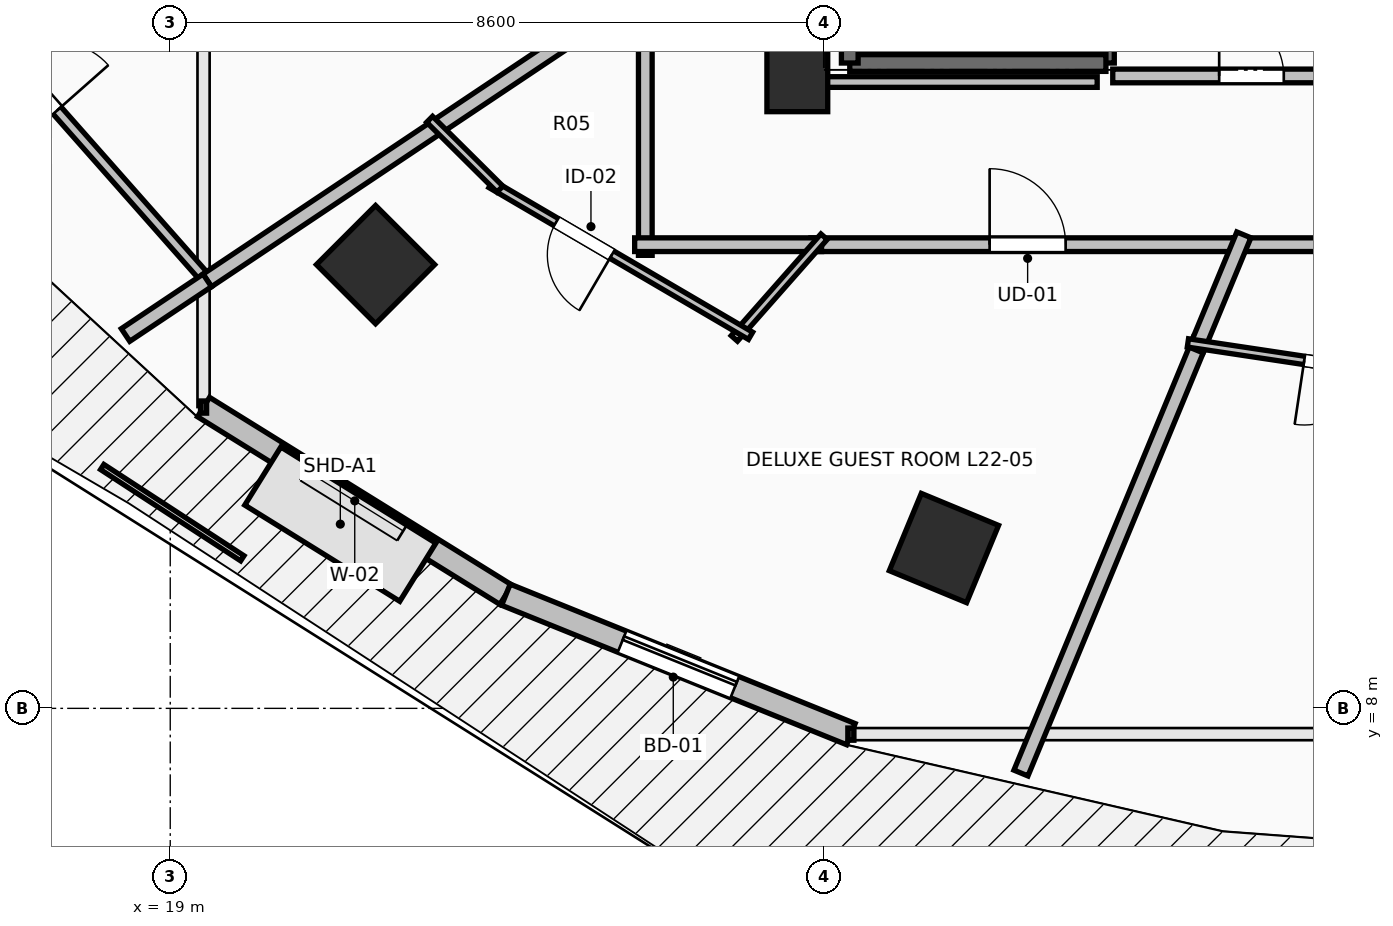
"""IFC4 building model, lengths in metres.
Left out: names, types, materials, properties, quantities, classifications, styles, units other than length and angle.
Written with IfcOpenShell. Run it as: python <this file> out.ifc"""

import sys

from ifc_helpers import new_model, si_unit, direction, frame, frame_2d, origin, origin_2d, place, context, subcontext, project, spatial, rectangle, extrude, element, fill, save


model = new_model("IFC4")
c1 = context("Model", 3, precision=1e-05, world=origin(), true_north=direction((0.0, 1.0)))
c2 = subcontext(c1, "Body", "Model", "MODEL_VIEW")
j1 = project(units=[si_unit("LENGTHUNIT", "METRE"), si_unit("PLANEANGLEUNIT", "RADIAN")], contexts=[c1])
p1 = place(None, origin())
s1 = spatial("IfcSite", under=j1, at=p1, CompositionType="ELEMENT")
p2 = place(p1, origin())
s2 = spatial("IfcBuilding", under=s1, at=p2, CompositionType="ELEMENT")
p3 = place(p2, frame((0.0, 0.0, 85.8)))
s3 = spatial("IfcBuildingStorey", under=s2, at=p3, CompositionType="ELEMENT", Elevation=85.8)
for number, where, z_axis, x_axis in (
    (1, (21.701, 13.838, 0.0), (0.0, 0.0, 1.0), (-0.707, -0.707, 0.0)),
    (2, (29.179, 10.109, 0.0), (0.0, 0.0, 1.0), (-0.383, -0.924, 0.0)),
):
    element("IfcColumn", number, at=place(p3, frame(where, z_axis=z_axis, x_axis=x_axis)), inside=s3, PredefinedType="COLUMN", context=c2, shape_type="SweptSolid", body=[
        extrude(rectangle(XDim=1.1, YDim=1.1, at=origin_2d()), origin(), (0.0, 0.0, 1.0), 3.5),
    ])
p4 = place(p3, frame((27.25, 16.45, 0.0), z_axis=(0.0, 0.0, 1.0), x_axis=(1.0, 0.0, 0.0)))
e3 = element("IfcColumn", 3, at=p4, inside=s3, PredefinedType="PILASTER", context=c2, shape_type="SweptSolid", body=[
    extrude(rectangle(XDim=0.8, YDim=1.2, at=origin_2d()), origin(), (0.0, 0.0, 1.0), 3.5),
])
p5 = place(p3, frame((19.438, 11.964, 0.0), z_axis=(0.0, 0.0, 1.0), x_axis=(0.849684479743, -0.527291461038, 0.0)))
e4 = element("IfcWall", 4, at=p5, inside=s3, PredefinedType="STANDARD", context=c2, shape_type="SweptSolid", body=[
    extrude(rectangle(XDim=4.681, YDim=0.3, at=frame_2d((2.341, 0.0))), origin(), (0.0, 0.0, 1.0), 3.24),
])
p6 = place(p5, frame((1.591, 0.0, 0.85)))
e5 = element("IfcOpeningElement", 5, at=p6, cuts=e4, PredefinedType="OPENING", context=c2, shape_type="SweptSolid", body=[
    extrude(rectangle(XDim=1.5, YDim=2.19, at=frame_2d((0.75, 1.095))), frame((0.0, 0.165, 0.0), z_axis=(0.0, -1.0, 0.0), x_axis=(1.0, 0.0, 0.0)), (0.0, 0.0, 1.0), 0.33),
])
p7 = place(p3, frame((23.416, 9.495, 0.0), z_axis=(0.0, 0.0, 1.0), x_axis=(0.927122233109, -0.374759075775, 0.0)))
e6 = element("IfcWall", 6, at=p7, inside=s3, PredefinedType="STANDARD", context=c2, shape_type="SweptSolid", body=[
    extrude(rectangle(XDim=4.895, YDim=0.3, at=frame_2d((2.448, 0.0))), origin(), (0.0, 0.0, 1.0), 3.24),
])
p8 = place(p7, frame((1.647, 0.0, 0.0)))
e7 = element("IfcOpeningElement", 7, at=p8, cuts=e6, PredefinedType="OPENING", context=c2, shape_type="SweptSolid", body=[
    extrude(rectangle(XDim=1.6, YDim=2.3, at=frame_2d((0.8, 1.15))), frame((0.0, 0.165, 0.0), z_axis=(0.0, -1.0, 0.0), x_axis=(1.0, 0.0, 0.0)), (0.0, 0.0, 1.0), 0.33),
])
p9 = place(p3, frame((31.31, 23.91, 0.0), z_axis=(0.0, 0.0, 1.0), x_axis=(0.0, -1.0, 0.0)))
e8 = element("IfcWall", 8, at=p9, inside=s3, PredefinedType="SOLIDWALL", context=c2, shape_type="SweptSolid", body=[
    extrude(rectangle(XDim=7.42, YDim=0.22, at=frame_2d((3.71, 0.0))), origin(), (0.0, 0.0, 1.0), 3.24),
])
p10 = place(p3, frame((31.31, 16.49, 0.0), z_axis=(0.0, 0.0, 1.0), x_axis=(-1.0, 0.0, 0.0)))
e9 = element("IfcWall", 9, at=p10, inside=s3, PredefinedType="SOLIDWALL", context=c2, shape_type="SweptSolid", body=[
    extrude(rectangle(XDim=3.37, YDim=0.22, at=frame_2d((1.685, 0.0))), origin(), (0.0, 0.0, 1.0), 3.24),
])
p11 = place(p3, frame((27.94, 16.49, 0.0), z_axis=(0.0, 0.0, 1.0), x_axis=(0.0, 1.0, 0.0)))
e10 = element("IfcWall", 10, at=p11, inside=s3, PredefinedType="SOLIDWALL", context=c2, shape_type="SweptSolid", body=[
    extrude(rectangle(XDim=7.42, YDim=0.22, at=frame_2d((3.71, 0.0))), origin(), (0.0, 0.0, 1.0), 3.24),
])
p12 = place(p3, frame((31.4, 16.32, 0.0), z_axis=(0.0, 0.0, 1.0), x_axis=(1.0, 0.0, 0.0)))
e11 = element("IfcWall", 11, at=p12, inside=s3, PredefinedType="PARTITIONING", context=c2, shape_type="SweptSolid", body=[
    extrude(rectangle(XDim=3.65, YDim=0.18, at=frame_2d((1.825, 0.0))), origin(), (0.0, 0.0, 1.0), 3.24),
])
p13 = place(p12, frame((1.4, 0.0, 0.0)))
e12 = element("IfcOpeningElement", 12, at=p13, cuts=e11, PredefinedType="OPENING", context=c2, shape_type="SweptSolid", body=[
    extrude(rectangle(XDim=0.85, YDim=2.1, at=frame_2d((0.425, 1.05))), frame((0.0, 0.105, 0.0), z_axis=(0.0, -1.0, 0.0), x_axis=(1.0, 0.0, 0.0)), (0.0, 0.0, 1.0), 0.21),
])
p14 = place(p3, frame((27.429, 14.1, 0.0), z_axis=(0.0, 0.0, 1.0), x_axis=(1.0, 0.0, 0.0)))
e13 = element("IfcWall", 13, at=p14, inside=s3, PredefinedType="PARTITIONING", context=c2, shape_type="SweptSolid", body=[
    extrude(rectangle(XDim=5.702, YDim=0.18, at=frame_2d((2.851, 0.0))), origin(), (0.0, 0.0, 1.0), 2.432),
])
p15 = place(p14, frame((2.351, 0.0, 0.0)))
e14 = element("IfcOpeningElement", 14, at=p15, cuts=e13, PredefinedType="OPENING", context=c2, shape_type="SweptSolid", body=[
    extrude(rectangle(XDim=1.0, YDim=2.15, at=frame_2d((0.5, 1.075))), frame((0.0, 0.105, 0.0), z_axis=(0.0, -1.0, 0.0), x_axis=(1.0, 0.0, 0.0)), (0.0, 0.0, 1.0), 0.21),
])
p16 = place(p3, frame((25.25, 17.549, 0.0), z_axis=(0.0, 0.0, 1.0), x_axis=(0.0, -1.0, 0.0)))
e15 = element("IfcWall", 15, at=p16, inside=s3, PredefinedType="PARTITIONING", context=c2, shape_type="SweptSolid", body=[
    extrude(rectangle(XDim=3.589, YDim=0.18, at=frame_2d((1.794, 0.0))), origin(), (0.0, 0.0, 1.0), 2.432),
])
p17 = place(p3, frame((25.11, 14.1, 0.0), z_axis=(0.0, 0.0, 1.0), x_axis=(1.0, 0.0, 0.0)))
e16 = element("IfcWall", 16, at=p17, inside=s3, PredefinedType="PARTITIONING", context=c2, shape_type="SweptSolid", body=[
    extrude(rectangle(XDim=2.459, YDim=0.18, at=frame_2d((1.229, 0.0))), origin(), (0.0, 0.0, 1.0), 2.874),
])
p18 = place(p3, frame((32.991, 14.1, 0.0), z_axis=(0.0, 0.0, 1.0), x_axis=(1.0, 0.0, 0.0)))
e17 = element("IfcWall", 17, at=p18, inside=s3, PredefinedType="PARTITIONING", context=c2, shape_type="SweptSolid", body=[
    extrude(rectangle(XDim=3.49, YDim=0.18, at=frame_2d((1.745, 0.0))), origin(), (0.0, 0.0, 1.0), 2.922),
])
p19 = place(p3, frame((14.94, 18.776, 0.0), z_axis=(0.0, 0.0, 1.0), x_axis=(0.662156478246, -0.749365597233, 0.0)))
e18 = element("IfcWall", 18, at=p19, inside=s3, PredefinedType="PARTITIONING", context=c2, shape_type="SweptSolid", body=[
    extrude(rectangle(XDim=6.867, YDim=0.14, at=frame_2d((3.434, 0.0))), origin(), (0.0, 0.0, 1.0), 3.24),
])
p20 = place(p19, frame((2.983, 0.0, 0.0)))
e19 = element("IfcOpeningElement", 19, at=p20, cuts=e18, PredefinedType="OPENING", context=c2, shape_type="SweptSolid", body=[
    extrude(rectangle(XDim=0.9, YDim=2.1, at=frame_2d((0.45, 1.05))), frame((0.0, 0.085, 0.0), z_axis=(0.0, -1.0, 0.0), x_axis=(1.0, 0.0, 0.0)), (0.0, 0.0, 1.0), 0.17),
])
p21 = place(p3, frame((19.487, 13.63, 0.0), z_axis=(0.0, 0.0, 1.0), x_axis=(0.831442874018, 0.555610247607, 0.0)))
e20 = element("IfcWall", 20, at=p21, inside=s3, PredefinedType="PARTITIONING", context=c2, shape_type="SweptSolid", body=[
    extrude(rectangle(XDim=6.931, YDim=0.2, at=frame_2d((3.466, 0.0))), origin(), (0.0, 0.0, 1.0), 2.432),
])
p22 = place(p3, frame((18.412, 12.912, 0.0), z_axis=(0.0, 0.0, 1.0), x_axis=(0.831643249848, 0.555310278118, 0.0)))
e21 = element("IfcWall", 21, at=p22, inside=s3, PredefinedType="PARTITIONING", context=c2, shape_type="SweptSolid", body=[
    extrude(rectangle(XDim=1.292, YDim=0.2, at=frame_2d((0.646, 0.0))), origin(), (0.0, 0.0, 1.0), 3.24),
])
p23 = place(p3, frame((27.602, 14.205, 0.0), z_axis=(0.0, 0.0, 1.0), x_axis=(-0.661454172329, -0.749985585134, 0.0)))
e22 = element("IfcWall", 22, at=p23, inside=s3, PredefinedType="PARTITIONING", context=c2, shape_type="SweptSolid", body=[
    extrude(rectangle(XDim=1.784, YDim=0.11, at=frame_2d((0.892, 0.0))), origin(), (0.0, 0.0, 1.0), 2.874),
])
p24 = place(p3, frame((26.635, 12.901, 0.0), z_axis=(0.0, 0.0, 1.0), x_axis=(-0.863173900656, 0.504906741117, 0.0)))
e23 = element("IfcWall", 23, at=p24, inside=s3, PredefinedType="PARTITIONING", context=c2, shape_type="SweptSolid", body=[
    extrude(rectangle(XDim=3.956, YDim=0.11, at=frame_2d((1.978, 0.0))), origin(), (0.0, 0.0, 1.0), 2.432),
])
p25 = place(p24, frame((2.113, 0.0, 0.0)))
e24 = element("IfcOpeningElement", 24, at=p25, cuts=e23, PredefinedType="OPENING", context=c2, shape_type="SweptSolid", body=[
    extrude(rectangle(XDim=0.85, YDim=2.1, at=frame_2d((0.425, 1.05))), frame((0.0, 0.07, 0.0), z_axis=(0.0, -1.0, 0.0), x_axis=(1.0, 0.0, 0.0)), (0.0, 0.0, 1.0), 0.14),
])
p26 = place(p3, frame((23.338, 14.831, 0.0), z_axis=(0.0, 0.0, 1.0), x_axis=(-0.709817225963, 0.70438590682, 0.0)))
e25 = element("IfcWall", 25, at=p26, inside=s3, PredefinedType="PARTITIONING", context=c2, shape_type="SweptSolid", body=[
    extrude(rectangle(XDim=1.303, YDim=0.11, at=frame_2d((0.652, 0.0))), origin(), (0.0, 0.0, 1.0), 2.432),
])
p27 = place(p3, frame((30.192, 7.149, 0.0), z_axis=(0.0, 0.0, 1.0), x_axis=(0.382705075352, 0.923870567395, 0.0)))
e26 = element("IfcWall", 26, at=p27, inside=s3, PredefinedType="PARTITIONING", context=c2, shape_type="SweptSolid", body=[
    extrude(rectangle(XDim=6.164, YDim=0.2, at=frame_2d((3.082, 0.0))), origin(), (0.0, 0.0, 1.0), 2.677),
])
p28 = place(p3, frame((32.497, 12.715, 0.0), z_axis=(0.0, 0.0, 1.0), x_axis=(0.382891039503, 0.923793511489, 0.0)))
e27 = element("IfcWall", 27, at=p28, inside=s3, PredefinedType="PARTITIONING", context=c2, shape_type="SweptSolid", body=[
    extrude(rectangle(XDim=1.639, YDim=0.2, at=frame_2d((0.82, 0.0))), origin(), (0.0, 0.0, 1.0), 2.922),
])
p29 = place(p3, frame((36.29, 12.221, 0.0), z_axis=(0.0, 0.0, 1.0), x_axis=(-0.988883185792, 0.148694468147, 0.0)))
e28 = element("IfcWall", 28, at=p29, inside=s3, PredefinedType="PARTITIONING", context=c2, shape_type="SweptSolid", body=[
    extrude(rectangle(XDim=3.946, YDim=0.11, at=frame_2d((1.973, 0.0))), origin(), (0.0, 0.0, 1.0), 3.24),
])
p30 = place(p29, frame((1.548, 0.0, 0.0)))
e29 = element("IfcOpeningElement", 29, at=p30, cuts=e28, PredefinedType="OPENING", context=c2, shape_type="SweptSolid", body=[
    extrude(rectangle(XDim=0.85, YDim=2.1, at=frame_2d((0.425, 1.05))), frame((0.0, 0.07, 0.0), z_axis=(0.0, -1.0, 0.0), x_axis=(1.0, 0.0, 0.0)), (0.0, 0.0, 1.0), 0.14),
])
p31 = place(p3, frame((31.195, 16.24, 0.0), z_axis=(0.0, 0.0, 1.0), x_axis=(-1.0, 0.0, 0.0)))
e30 = element("IfcWall", 30, at=p31, inside=s3, PredefinedType="PARTITIONING", context=c2, shape_type="SweptSolid", body=[
    extrude(rectangle(XDim=3.745, YDim=0.14, at=frame_2d((1.873, 0.0))), origin(), (0.0, 0.0, 1.0), 2.432),
])
p32 = place(p3, frame((27.45, 16.24, 0.0), z_axis=(0.0, 0.0, 1.0), x_axis=(0.0, 1.0, 0.0)))
e31 = element("IfcWall", 31, at=p32, inside=s3, PredefinedType="PARTITIONING", context=c2, shape_type="SweptSolid", body=[
    extrude(rectangle(XDim=7.514, YDim=0.14, at=frame_2d((3.757, 0.0))), origin(), (0.0, 0.0, 1.0), 2.432),
])
p33 = place(p8, origin())
e32 = element("IfcDoor", 32, at=p33, inside=s3, OperationType="SLIDING_TO_LEFT", PredefinedType="DOOR", context=c2, shape_type="SweptSolid", body=[
    extrude(rectangle(XDim=1.6, YDim=2.3, at=frame_2d((0.8, 1.15))), frame((0.0, 0.025, 0.0), z_axis=(0.0, -1.0, 0.0), x_axis=(1.0, 0.0, 0.0)), (0.0, 0.0, 1.0), 0.05),
])
fill(e7, e32)
p34 = place(p6, origin())
e33 = element("IfcWindow", 33, at=p34, inside=s3, PartitioningType="SINGLE_PANEL", PredefinedType="WINDOW", context=c2, shape_type="SweptSolid", body=[
    extrude(rectangle(XDim=1.5, YDim=2.19, at=frame_2d((0.75, 1.095))), frame((0.0, 0.03, 0.0), z_axis=(0.0, -1.0, 0.0), x_axis=(1.0, 0.0, 0.0)), (0.0, 0.0, 1.0), 0.06),
])
fill(e5, e33)
p35 = place(p13, origin())
e34 = element("IfcDoor", 34, at=p35, inside=s3, OperationType="SINGLE_SWING_LEFT", PredefinedType="DOOR", context=c2, shape_type="SweptSolid", body=[
    extrude(rectangle(XDim=0.85, YDim=2.1, at=frame_2d((0.425, 1.05))), frame((0.0, 0.025, 0.0), z_axis=(0.0, -1.0, 0.0), x_axis=(1.0, 0.0, 0.0)), (0.0, 0.0, 1.0), 0.05),
])
fill(e12, e34)
p36 = place(p15, origin())
e35 = element("IfcDoor", 35, at=p36, inside=s3, OperationType="SINGLE_SWING_LEFT", PredefinedType="DOOR", context=c2, shape_type="SweptSolid", body=[
    extrude(rectangle(XDim=1.0, YDim=2.15, at=frame_2d((0.5, 1.075))), frame((0.0, 0.025, 0.0), z_axis=(0.0, -1.0, 0.0), x_axis=(1.0, 0.0, 0.0)), (0.0, 0.0, 1.0), 0.05),
])
fill(e14, e35)
p37 = place(p20, origin())
e36 = element("IfcDoor", 36, at=p37, inside=s3, OperationType="SINGLE_SWING_RIGHT", PredefinedType="DOOR", context=c2, shape_type="SweptSolid", body=[
    extrude(rectangle(XDim=0.9, YDim=2.1, at=frame_2d((0.45, 1.05))), frame((0.0, 0.025, 0.0), z_axis=(0.0, -1.0, 0.0), x_axis=(1.0, 0.0, 0.0)), (0.0, 0.0, 1.0), 0.05),
])
fill(e19, e36)
p38 = place(p25, origin())
e37 = element("IfcDoor", 37, at=p38, inside=s3, OperationType="SINGLE_SWING_LEFT", PredefinedType="DOOR", context=c2, shape_type="SweptSolid", body=[
    extrude(rectangle(XDim=0.85, YDim=2.1, at=frame_2d((0.425, 1.05))), frame((0.0, 0.025, 0.0), z_axis=(0.0, -1.0, 0.0), x_axis=(1.0, 0.0, 0.0)), (0.0, 0.0, 1.0), 0.05),
])
fill(e24, e37)
p39 = place(p30, origin())
e38 = element("IfcDoor", 38, at=p39, inside=s3, OperationType="SINGLE_SWING_RIGHT", PredefinedType="DOOR", context=c2, shape_type="SweptSolid", body=[
    extrude(rectangle(XDim=0.85, YDim=2.1, at=frame_2d((0.425, 1.05))), frame((0.0, 0.025, 0.0), z_axis=(0.0, -1.0, 0.0), x_axis=(1.0, 0.0, 0.0)), (0.0, 0.0, 1.0), 0.05),
])
fill(e29, e38)
save(model, sys.argv[1])
